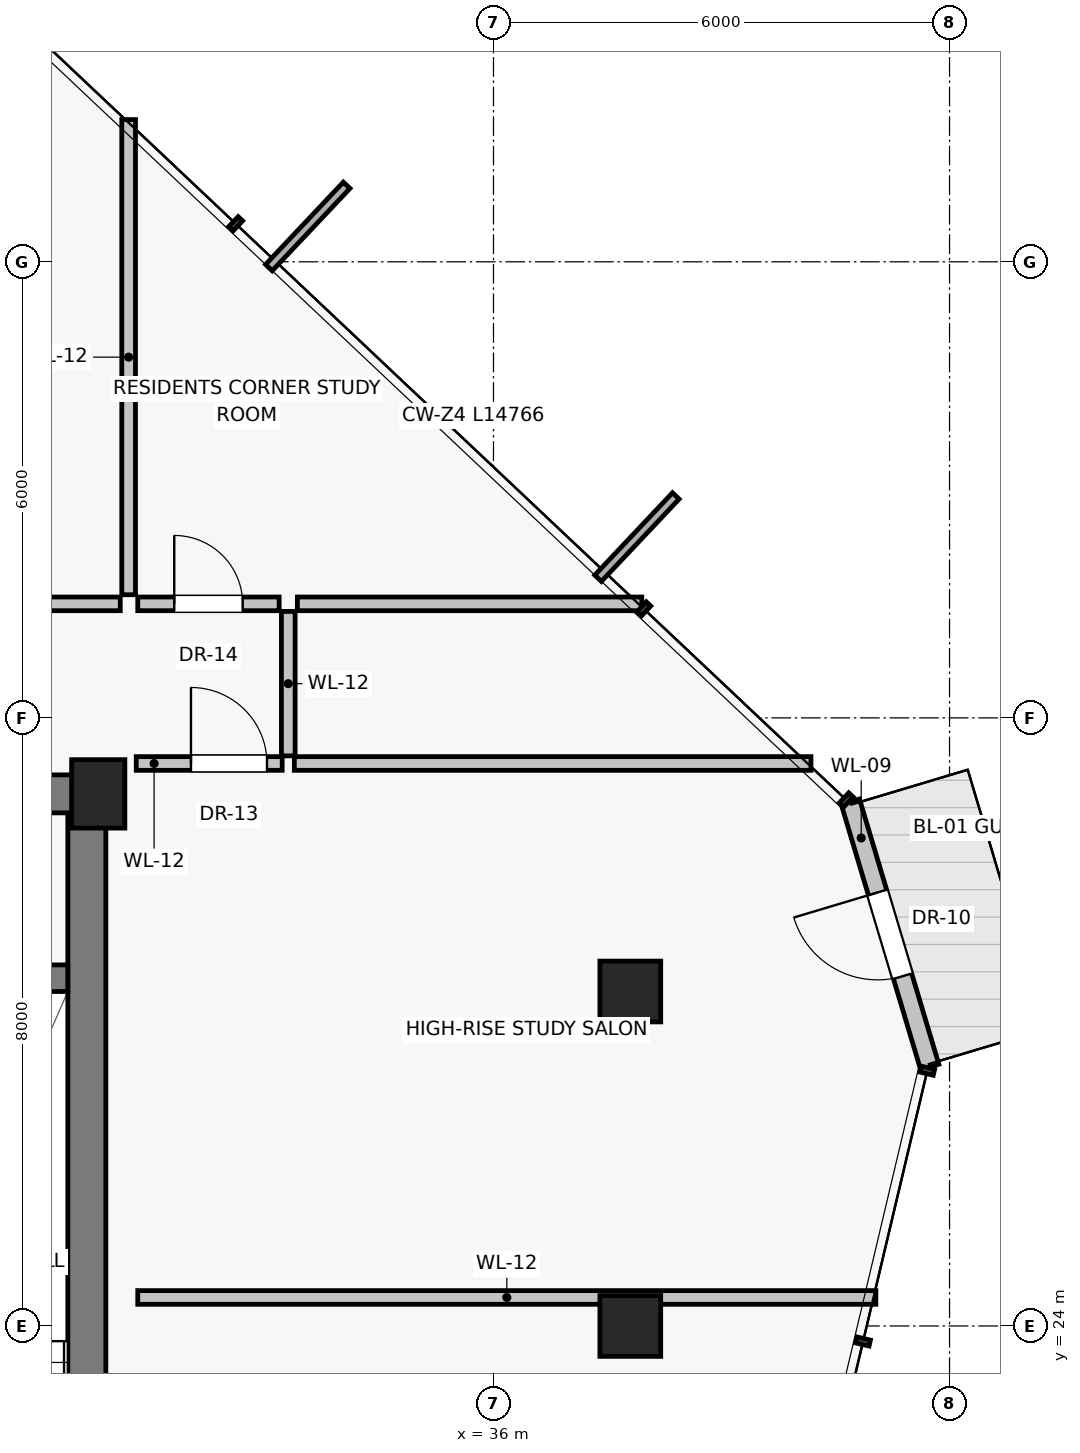
"""IFC4 building model, lengths in metres.
Left out: names, types, materials, properties, quantities, classifications, styles, units other than length and angle.
Written with IfcOpenShell. Run it as: python <this file> out.ifc"""

import sys

from ifc_helpers import new_model, si_unit, direction, frame, frame_2d, origin, origin_2d, place, context, subcontext, project, spatial, rectangle, extrude, source, transform, mapped, element, fill, save


model = new_model("IFC4")
c1 = context("Model", 3, precision=1e-05, world=origin(), true_north=direction((0.0, 1.0)))
c2 = subcontext(c1, "Body", "Model", "MODEL_VIEW")
j1 = project(units=[si_unit("LENGTHUNIT", "METRE"), si_unit("PLANEANGLEUNIT", "RADIAN")], contexts=[c1])
p1 = place(None, origin())
s1 = spatial("IfcSite", under=j1, at=p1, CompositionType="ELEMENT")
p2 = place(p1, origin())
s2 = spatial("IfcBuilding", under=s1, at=p2, CompositionType="ELEMENT")
p3 = place(p2, frame((0.0, 0.0, 254.5)))
s3 = spatial("IfcBuildingStorey", under=s2, at=p3, CompositionType="ELEMENT", Elevation=254.5)
p4 = place(p3, frame((30.8, 31.0, 0.0), z_axis=(0.0, 0.0, 1.0), x_axis=(1.0, 0.0, 0.0)))
e1 = element("IfcColumn", 1, at=p4, inside=s3, PredefinedType="PILASTER", context=c2, shape_type="SweptSolid", body=[
    extrude(rectangle(XDim=0.7, YDim=0.9, at=origin_2d()), origin(), (0.0, 0.0, 1.0), 3.25),
])
for number, where, z_axis, x_axis in (
    (2, (37.8, 24.0, 0.0), (0.0, 0.0, 1.0), (1.0, 0.0, 0.0)),
    (3, (37.8, 28.4, 0.0), (0.0, 0.0, 1.0), (1.0, 0.0, 0.0)),
):
    element("IfcColumn", number, at=place(p3, frame(where, z_axis=z_axis, x_axis=x_axis)), inside=s3, PredefinedType="COLUMN", context=c2, shape_type="SweptSolid", body=[
        extrude(rectangle(XDim=0.8, YDim=0.8, at=origin_2d()), origin(), (0.0, 0.0, 1.0), 3.25),
    ])
p5 = place(p3, frame((41.74, 27.407, 0.0), z_axis=(0.0, 0.0, 1.0), x_axis=(-0.286720644461, 0.958014233736, 0.0)))
e4 = element("IfcWall", 4, at=p5, inside=s3, PredefinedType="SOLIDWALL", context=c2, shape_type="SweptSolid", body=[
    extrude(rectangle(XDim=3.643, YDim=0.25, at=frame_2d((1.821, 0.0))), origin(), (0.0, 0.0, 1.0), 3.015),
])
p6 = place(p5, frame((1.246, 0.0, 0.0)))
e5 = element("IfcOpeningElement", 5, at=p6, cuts=e4, PredefinedType="OPENING", context=c2, shape_type="SweptSolid", body=[
    extrude(rectangle(XDim=1.15, YDim=2.25, at=frame_2d((0.575, 1.125))), frame((0.0, 0.135, 0.0), z_axis=(0.0, -1.0, 0.0), x_axis=(1.0, 0.0, 0.0)), (0.0, 0.0, 1.0), 0.27),
])
p7 = place(p3, frame((30.65, 16.8, 0.0), z_axis=(0.0, 0.0, 1.0), x_axis=(0.0, 1.0, 0.0)))
e6 = element("IfcWall", 6, at=p7, inside=s3, PredefinedType="SHEAR", context=c2, shape_type="SweptSolid", body=[
    extrude(rectangle(XDim=14.2, YDim=0.5, at=frame_2d((7.1, 0.0))), origin(), (0.0, 0.0, 1.0), 3.015),
])
p8 = place(p3, frame((27.0, 31.0, 0.0), z_axis=(0.0, 0.0, 1.0), x_axis=(1.0, 0.0, 0.0)))
e7 = element("IfcWall", 7, at=p8, inside=s3, PredefinedType="SHEAR", context=c2, shape_type="SweptSolid", body=[
    extrude(rectangle(XDim=3.8, YDim=0.5, at=frame_2d((1.9, 0.0))), origin(), (0.0, 0.0, 1.0), 3.015),
])
p9 = place(p8, frame((0.45, 0.0, 0.0)))
e8 = element("IfcOpeningElement", 8, at=p9, cuts=e7, PredefinedType="OPENING", context=c2, shape_type="SweptSolid", body=[
    extrude(rectangle(XDim=0.86, YDim=2.01, at=frame_2d((0.43, 1.005))), frame((0.0, 0.26, 0.0), z_axis=(0.0, -1.0, 0.0), x_axis=(1.0, 0.0, 0.0)), (0.0, 0.0, 1.0), 0.52),
])
p10 = place(p8, frame((1.9, 0.0, 0.0)))
e9 = element("IfcOpeningElement", 9, at=p10, cuts=e7, PredefinedType="OPENING", context=c2, shape_type="SweptSolid", body=[
    extrude(rectangle(XDim=0.86, YDim=2.01, at=frame_2d((0.43, 1.005))), frame((0.0, 0.26, 0.0), z_axis=(0.0, -1.0, 0.0), x_axis=(1.0, 0.0, 0.0)), (0.0, 0.0, 1.0), 0.52),
])
p11 = place(p3, frame((27.025, 28.575, 0.0), z_axis=(0.0, 0.0, 1.0), x_axis=(1.0, 0.0, 0.0)))
e10 = element("IfcWall", 10, at=p11, inside=s3, PredefinedType="SHEAR", context=c2, shape_type="SweptSolid", body=[
    extrude(rectangle(XDim=3.375, YDim=0.35, at=frame_2d((1.688, 0.0))), origin(), (0.0, 0.0, 1.0), 3.015),
])
p12 = place(p3, frame((31.2, 33.62, 0.0), z_axis=(0.0, 0.0, 1.0), x_axis=(0.0, 1.0, 0.0)))
e11 = element("IfcWall", 11, at=p12, inside=s3, PredefinedType="PARTITIONING", context=c2, shape_type="SweptSolid", body=[
    extrude(rectangle(XDim=6.251, YDim=0.18, at=frame_2d((3.125, 0.0))), origin(), (0.0, 0.0, 1.0), 3.015),
])
p13 = place(p3, frame((25.18, 33.5, 0.0), z_axis=(0.0, 0.0, 1.0), x_axis=(1.0, 0.0, 0.0)))
e12 = element("IfcWall", 12, at=p13, inside=s3, PredefinedType="PARTITIONING", context=c2, shape_type="SweptSolid", body=[
    extrude(rectangle(XDim=5.91, YDim=0.18, at=frame_2d((2.955, 0.0))), origin(), (0.0, 0.0, 1.0), 3.015),
])
p14 = place(p13, frame((3.574, 0.0, 0.0)))
e13 = element("IfcOpeningElement", 13, at=p14, cuts=e12, PredefinedType="OPENING", context=c2, shape_type="SweptSolid", body=[
    extrude(rectangle(XDim=0.95, YDim=2.02, at=frame_2d((0.475, 1.01))), frame((0.0, 0.1, 0.0), z_axis=(0.0, -1.0, 0.0), x_axis=(1.0, 0.0, 0.0)), (0.0, 0.0, 1.0), 0.2),
])
p15 = place(p3, frame((31.32, 24.375, 0.0), z_axis=(0.0, 0.0, 1.0), x_axis=(1.0, 0.0, 0.0)))
e14 = element("IfcWall", 14, at=p15, inside=s3, PredefinedType="PARTITIONING", context=c2, shape_type="SweptSolid", body=[
    extrude(rectangle(XDim=9.71, YDim=0.18, at=frame_2d((4.855, 0.0))), origin(), (0.0, 0.0, 1.0), 3.015),
])
p16 = place(p3, frame((33.3, 31.5, 0.0), z_axis=(0.0, 0.0, 1.0), x_axis=(0.0, 1.0, 0.0)))
e15 = element("IfcWall", 15, at=p16, inside=s3, PredefinedType="PARTITIONING", context=c2, shape_type="SweptSolid", body=[
    extrude(rectangle(XDim=1.9, YDim=0.18, at=frame_2d((0.95, 0.0))), origin(), (0.0, 0.0, 1.0), 3.015),
])
p17 = place(p3, frame((31.3, 31.4, 0.0), z_axis=(0.0, 0.0, 1.0), x_axis=(1.0, 0.0, 0.0)))
e16 = element("IfcWall", 16, at=p17, inside=s3, PredefinedType="PARTITIONING", context=c2, shape_type="SweptSolid", body=[
    extrude(rectangle(XDim=1.92, YDim=0.18, at=frame_2d((0.96, 0.0))), origin(), (0.0, 0.0, 1.0), 3.015),
])
p18 = place(p17, frame((0.72, 0.0, 0.0)))
e17 = element("IfcOpeningElement", 17, at=p18, cuts=e16, PredefinedType="OPENING", context=c2, shape_type="SweptSolid", body=[
    extrude(rectangle(XDim=1.0, YDim=2.01, at=frame_2d((0.5, 1.005))), frame((0.0, 0.1, 0.0), z_axis=(0.0, -1.0, 0.0), x_axis=(1.0, 0.0, 0.0)), (0.0, 0.0, 1.0), 0.2),
])
p19 = place(p3, frame((33.38, 31.4, 0.0), z_axis=(0.0, 0.0, 1.0), x_axis=(1.0, 0.0, 0.0)))
e18 = element("IfcWall", 18, at=p19, inside=s3, PredefinedType="PARTITIONING", context=c2, shape_type="SweptSolid", body=[
    extrude(rectangle(XDim=6.797, YDim=0.18, at=frame_2d((3.398, 0.0))), origin(), (0.0, 0.0, 1.0), 3.015),
])
p20 = place(p3, frame((33.42, 33.5, 0.0), z_axis=(0.0, 0.0, 1.0), x_axis=(1.0, 0.0, 0.0)))
e19 = element("IfcWall", 19, at=p20, inside=s3, PredefinedType="PARTITIONING", context=c2, shape_type="SweptSolid", body=[
    extrude(rectangle(XDim=4.531, YDim=0.18, at=frame_2d((2.266, 0.0))), origin(), (0.0, 0.0, 1.0), 3.015),
])
p21 = place(p3, frame((31.32, 33.5, 0.0), z_axis=(0.0, 0.0, 1.0), x_axis=(1.0, 0.0, 0.0)))
e20 = element("IfcWall", 20, at=p21, inside=s3, PredefinedType="PARTITIONING", context=c2, shape_type="SweptSolid", body=[
    extrude(rectangle(XDim=1.86, YDim=0.18, at=frame_2d((0.93, 0.0))), origin(), (0.0, 0.0, 1.0), 3.015),
])
p22 = place(p21, frame((0.48, 0.0, 0.0)))
e21 = element("IfcOpeningElement", 21, at=p22, cuts=e20, PredefinedType="OPENING", context=c2, shape_type="SweptSolid", body=[
    extrude(rectangle(XDim=0.9, YDim=2.01, at=frame_2d((0.45, 1.005))), frame((0.0, 0.1, 0.0), z_axis=(0.0, -1.0, 0.0), x_axis=(1.0, 0.0, 0.0)), (0.0, 0.0, 1.0), 0.2),
])
m1 = source(origin(), c2, "Body", "SweptSolid", [
    extrude(rectangle(XDim=1.15, YDim=2.25, at=frame_2d((0.575, 1.125))), frame((0.0, 0.025, 0.0), z_axis=(0.0, -1.0, 0.0), x_axis=(1.0, 0.0, 0.0)), (0.0, 0.0, 1.0), 0.05),
])
p23 = place(p6, frame((1.15, 0.0, 0.0), z_axis=(0.0, 0.0, 1.0), x_axis=(-1.0, 0.0, 0.0)))
e22 = element("IfcDoor", 22, at=p23, inside=s3, OperationType="SINGLE_SWING_RIGHT", PredefinedType="DOOR", context=c2, shape_type="MappedRepresentation", body=[
    mapped(m1, transform((0.0, 0.0, 0.0), scale=1.0)),
])
fill(e5, e22)
m2 = source(origin(), c2, "Body", "SweptSolid", [
    extrude(rectangle(XDim=1.0, YDim=2.01, at=frame_2d((0.5, 1.005))), frame((0.0, 0.025, 0.0), z_axis=(0.0, -1.0, 0.0), x_axis=(1.0, 0.0, 0.0)), (0.0, 0.0, 1.0), 0.05),
])
p24 = place(p18, origin())
e23 = element("IfcDoor", 23, at=p24, inside=s3, OperationType="SINGLE_SWING_LEFT", PredefinedType="DOOR", context=c2, shape_type="MappedRepresentation", body=[
    mapped(m2, transform((0.0, 0.0, 0.0), scale=1.0)),
])
fill(e17, e23)
m3 = source(origin(), c2, "Body", "SweptSolid", [
    extrude(rectangle(XDim=0.9, YDim=2.01, at=frame_2d((0.45, 1.005))), frame((0.0, 0.025, 0.0), z_axis=(0.0, -1.0, 0.0), x_axis=(1.0, 0.0, 0.0)), (0.0, 0.0, 1.0), 0.05),
])
p25 = place(p22, origin())
e24 = element("IfcDoor", 24, at=p25, inside=s3, OperationType="SINGLE_SWING_LEFT", PredefinedType="DOOR", context=c2, shape_type="MappedRepresentation", body=[
    mapped(m3, transform((0.0, 0.0, 0.0), scale=1.0)),
])
fill(e21, e24)
save(model, sys.argv[1])
